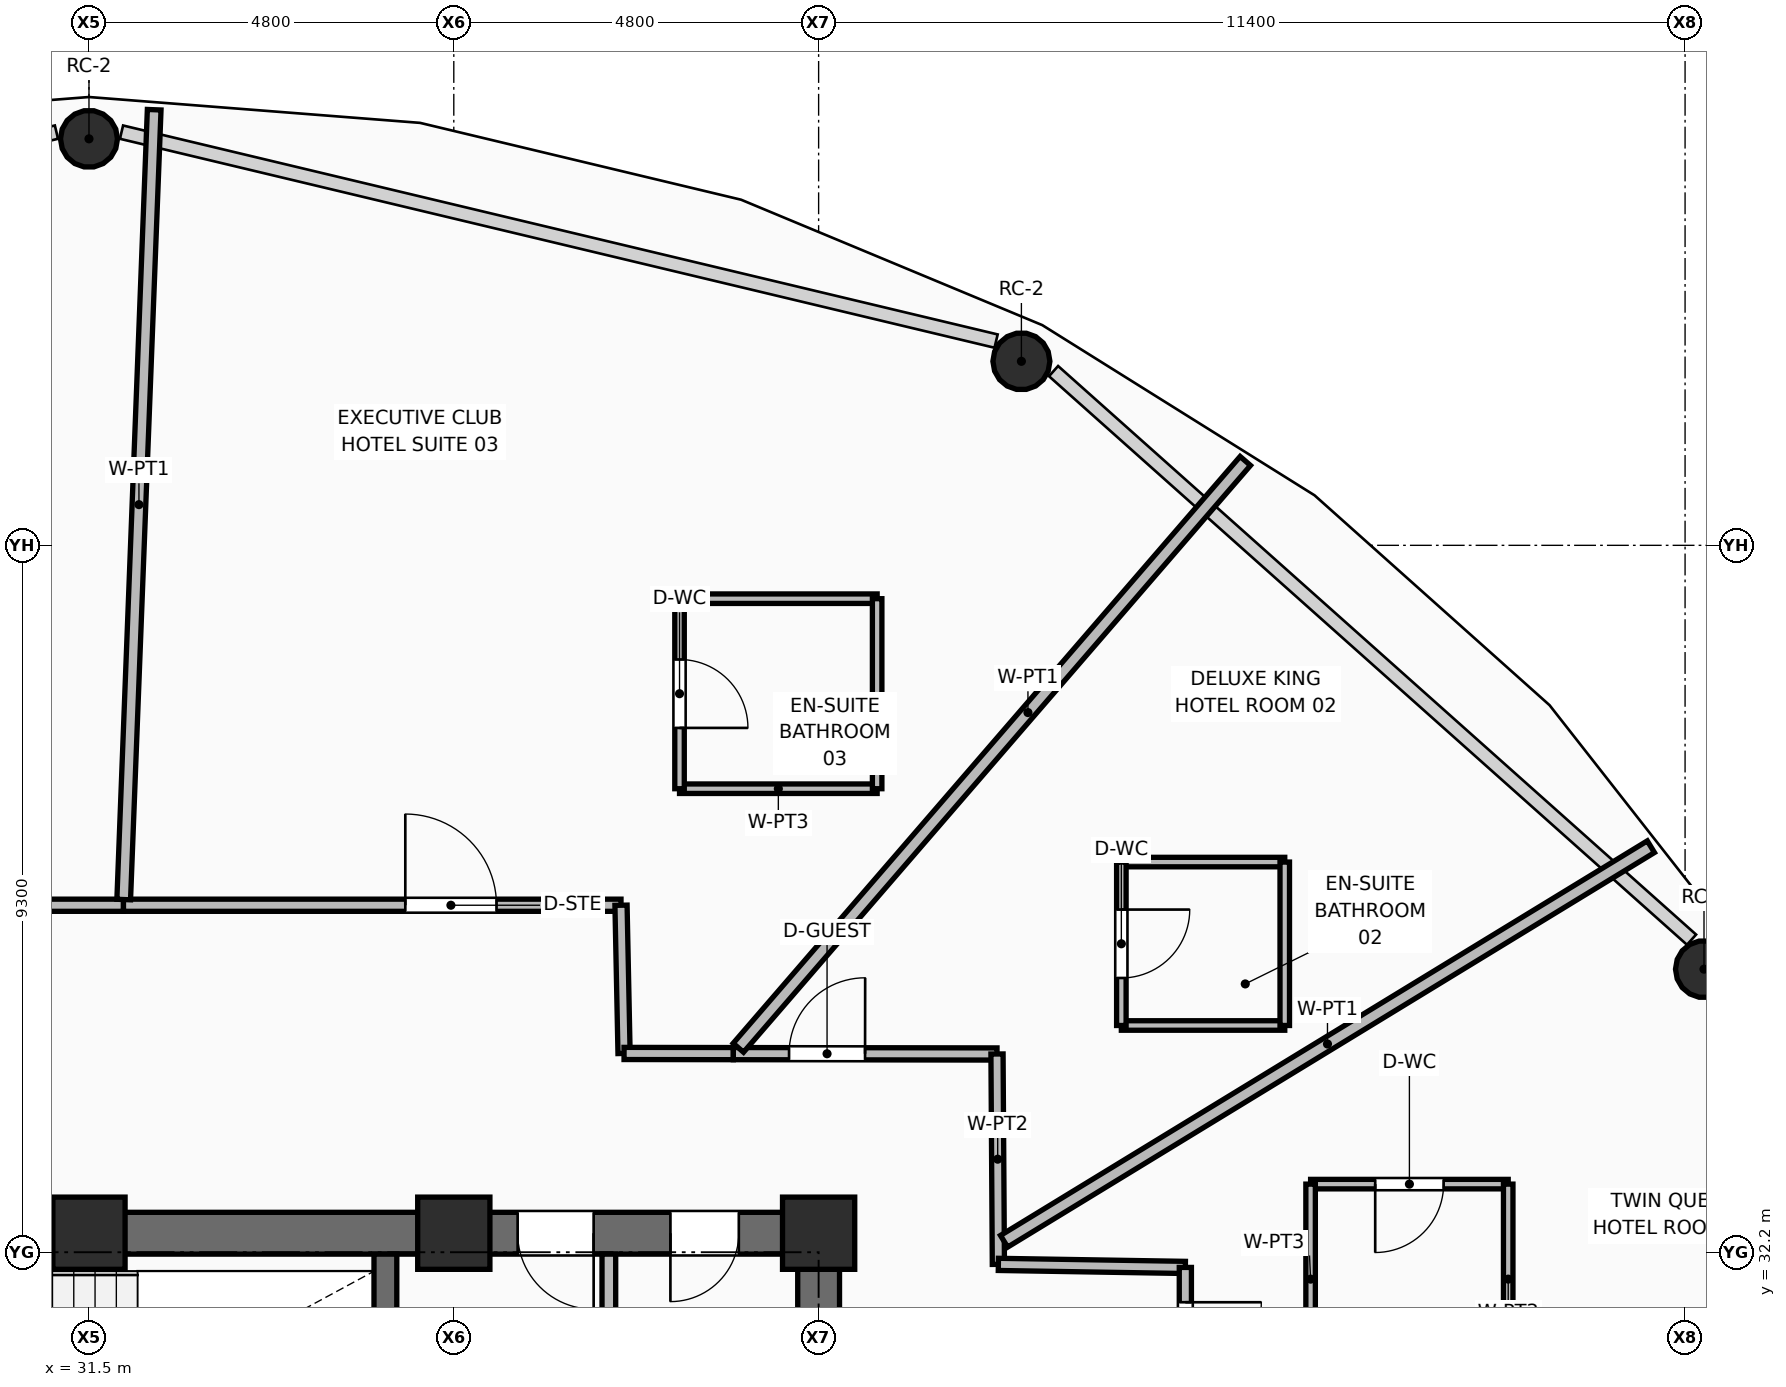
"""IFC4 building model, lengths in metres.
Left out: names, types, materials, properties, quantities, classifications, styles, units other than length and angle.
Written with IfcOpenShell. Run it as: python <this file> out.ifc"""

import sys

from ifc_helpers import new_model, si_unit, direction, frame, frame_2d, origin, origin_2d, place, context, subcontext, project, spatial, rectangle, hollow_circle, extrude, element, fill, save


model = new_model("IFC4")
c1 = context("Model", 3, precision=1e-05, world=origin(), true_north=direction((0.0, 1.0)))
c2 = subcontext(c1, "Body", "Model", "MODEL_VIEW")
j1 = project(units=[si_unit("LENGTHUNIT", "METRE"), si_unit("PLANEANGLEUNIT", "RADIAN")], contexts=[c1])
p1 = place(None, origin())
s1 = spatial("IfcSite", under=j1, at=p1, CompositionType="ELEMENT")
p2 = place(p1, origin())
s2 = spatial("IfcBuilding", under=s1, at=p2, CompositionType="ELEMENT")
p3 = place(p2, frame((0.0, 0.0, 168.45)))
s3 = spatial("IfcBuildingStorey", under=s2, at=p3, CompositionType="ELEMENT", Elevation=168.45)
for number, where, z_axis, x_axis in (
    (1, (31.5, 32.45, 0.0), (0.0, 0.0, 1.0), (1.0, 0.0, 0.0)),
    (2, (36.3, 32.45, 0.0), (0.0, 0.0, 1.0), (1.0, 0.0, 0.0)),
    (3, (41.1, 32.45, 0.0), (0.0, 0.0, 1.0), (1.0, 0.0, 0.0)),
):
    element("IfcColumn", number, at=place(p3, frame(where, z_axis=z_axis, x_axis=x_axis)), inside=s3, PredefinedType="COLUMN", context=c2, shape_type="SweptSolid", body=[
        extrude(rectangle(XDim=0.95, YDim=0.95, at=origin_2d()), origin(), (0.0, 0.0, 1.0), 3.75),
    ])
for number, where, z_axis, x_axis in (
    (4, (52.749, 35.924, 0.0), (0.0, 0.0, 1.0), (1.0, 0.0, 0.0)),
    (5, (43.768, 43.921, 0.0), (0.0, 0.0, 1.0), (1.0, 0.0, 0.0)),
    (6, (31.5, 46.848, 0.0), (0.0, 0.0, 1.0), (1.0, 0.0, 0.0)),
):
    element("IfcColumn", number, at=place(p3, frame(where, z_axis=z_axis, x_axis=x_axis)), inside=s3, PredefinedType="COLUMN", context=c2, shape_type="SweptSolid", body=[
        extrude(hollow_circle(Radius=0.375, WallThickness=0.035, at=origin_2d()), origin(), (0.0, 0.0, 1.0), 3.57),
    ])
p4 = place(p3, frame((21.625, 32.45, 0.0), z_axis=(0.0, 0.0, 1.0), x_axis=(1.0, 0.0, 0.0)))
e7 = element("IfcWall", 7, at=p4, inside=s3, PredefinedType="SHEAR", context=c2, shape_type="SweptSolid", body=[
    extrude(rectangle(XDim=19.75, YDim=0.55, at=frame_2d((9.875, 0.0))), origin(), (0.0, 0.0, 1.0), 3.57),
])
p5 = place(p4, frame((2.125, 0.0, 0.0)))
e8 = element("IfcOpeningElement", 8, at=p5, cuts=e7, PredefinedType="OPENING", context=c2, shape_type="SweptSolid", body=[
    extrude(rectangle(XDim=1.1, YDim=2.1, at=frame_2d((0.55, 1.05))), frame((0.0, 0.285, 0.0), z_axis=(0.0, -1.0, 0.0), x_axis=(1.0, 0.0, 0.0)), (0.0, 0.0, 1.0), 0.57),
])
p6 = place(p4, frame((15.515, 0.0, 0.0)))
e9 = element("IfcOpeningElement", 9, at=p6, cuts=e7, PredefinedType="OPENING", context=c2, shape_type="SweptSolid", body=[
    extrude(rectangle(XDim=1.0, YDim=2.1, at=frame_2d((0.5, 1.05))), frame((0.0, 0.285, 0.0), z_axis=(0.0, -1.0, 0.0), x_axis=(1.0, 0.0, 0.0)), (0.0, 0.0, 1.0), 0.57),
])
p7 = place(p4, frame((17.525, 0.0, 0.0)))
e10 = element("IfcOpeningElement", 10, at=p7, cuts=e7, PredefinedType="OPENING", context=c2, shape_type="SweptSolid", body=[
    extrude(rectangle(XDim=0.9, YDim=2.1, at=frame_2d((0.45, 1.05))), frame((0.0, 0.285, 0.0), z_axis=(0.0, -1.0, 0.0), x_axis=(1.0, 0.0, 0.0)), (0.0, 0.0, 1.0), 0.57),
])
p8 = place(p3, frame((41.1, 18.075, 0.0), z_axis=(0.0, 0.0, 1.0), x_axis=(0.0, 1.0, 0.0)))
e11 = element("IfcWall", 11, at=p8, inside=s3, PredefinedType="SHEAR", context=c2, shape_type="SweptSolid", body=[
    extrude(rectangle(XDim=14.1, YDim=0.55, at=frame_2d((7.05, 0.0))), origin(), (0.0, 0.0, 1.0), 3.57),
])
p9 = place(p8, frame((3.385, 0.0, 0.0)))
e12 = element("IfcOpeningElement", 12, at=p9, cuts=e11, PredefinedType="OPENING", context=c2, shape_type="SweptSolid", body=[
    extrude(rectangle(XDim=1.05, YDim=2.1, at=frame_2d((0.525, 1.05))), frame((0.0, 0.285, 0.0), z_axis=(0.0, -1.0, 0.0), x_axis=(1.0, 0.0, 0.0)), (0.0, 0.0, 1.0), 0.57),
])
p10 = place(p3, frame((35.4, 28.75, 0.0), z_axis=(0.0, 0.0, 1.0), x_axis=(0.0, 1.0, 0.0)))
e13 = element("IfcWall", 13, at=p10, inside=s3, PredefinedType="SHEAR", context=c2, shape_type="SweptSolid", body=[
    extrude(rectangle(XDim=3.425, YDim=0.3, at=frame_2d((1.712, 0.0))), origin(), (0.0, 0.0, 1.0), 3.57),
])
p11 = place(p3, frame((38.34, 28.62, 0.0), z_axis=(0.0, 0.0, 1.0), x_axis=(0.0, 1.0, 0.0)))
e14 = element("IfcWall", 14, at=p11, inside=s3, PredefinedType="PARTITIONING", context=c2, shape_type="SweptSolid", body=[
    extrude(rectangle(XDim=3.555, YDim=0.18, at=frame_2d((1.777, 0.0))), origin(), (0.0, 0.0, 1.0), 3.55),
])
p12 = place(p3, frame((24.496, 36.765, 0.0), z_axis=(0.0, 0.0, 1.0), x_axis=(1.0, 0.0, 0.0)))
e15 = element("IfcWall", 15, at=p12, inside=s3, PredefinedType="PARTITIONING", context=c2, shape_type="SweptSolid", body=[
    extrude(rectangle(XDim=7.458, YDim=0.16, at=frame_2d((3.729, 0.0))), origin(), (0.0, 0.0, 1.0), 3.006),
])
p13 = place(p12, frame((2.684, 0.0, 0.0)))
e16 = element("IfcOpeningElement", 16, at=p13, cuts=e15, PredefinedType="OPENING", context=c2, shape_type="SweptSolid", body=[
    extrude(rectangle(XDim=1.2, YDim=2.1, at=frame_2d((0.6, 1.05))), frame((0.0, 0.09, 0.0), z_axis=(0.0, -1.0, 0.0), x_axis=(1.0, 0.0, 0.0)), (0.0, 0.0, 1.0), 0.18),
])
p14 = place(p3, frame((31.954, 36.765, 0.0), z_axis=(0.0, 0.0, 1.0), x_axis=(1.0, 0.0, 0.0)))
e17 = element("IfcWall", 17, at=p14, inside=s3, PredefinedType="PARTITIONING", context=c2, shape_type="SweptSolid", body=[
    extrude(rectangle(XDim=6.546, YDim=0.16, at=frame_2d((3.273, 0.0))), origin(), (0.0, 0.0, 1.0), 3.55),
])
p15 = place(p14, frame((3.708, 0.0, 0.0)))
e18 = element("IfcOpeningElement", 18, at=p15, cuts=e17, PredefinedType="OPENING", context=c2, shape_type="SweptSolid", body=[
    extrude(rectangle(XDim=1.2, YDim=2.1, at=frame_2d((0.6, 1.05))), frame((0.0, 0.09, 0.0), z_axis=(0.0, -1.0, 0.0), x_axis=(1.0, 0.0, 0.0)), (0.0, 0.0, 1.0), 0.18),
])
p16 = place(p3, frame((38.5, 36.765, 0.0), z_axis=(0.0, 0.0, 1.0), x_axis=(0.020529039459, -0.999789257063, 0.0)))
e19 = element("IfcWall", 19, at=p16, inside=s3, PredefinedType="PARTITIONING", context=c2, shape_type="SweptSolid", body=[
    extrude(rectangle(XDim=1.95, YDim=0.16, at=frame_2d((0.975, 0.0))), origin(), (0.0, 0.0, 1.0), 3.55),
])
p17 = place(p3, frame((38.54, 34.815, 0.0), z_axis=(0.0, 0.0, 1.0), x_axis=(0.999999077601, -0.001358233043, 0.0)))
e20 = element("IfcWall", 20, at=p17, inside=s3, PredefinedType="PARTITIONING", context=c2, shape_type="SweptSolid", body=[
    extrude(rectangle(XDim=1.438, YDim=0.16, at=frame_2d((0.719, 0.0))), origin(), (0.0, 0.0, 1.0), 3.55),
])
p18 = place(p3, frame((39.978, 34.813, 0.0), z_axis=(0.0, 0.0, 1.0), x_axis=(0.999999009391, -0.001407557195, 0.0)))
e21 = element("IfcWall", 21, at=p18, inside=s3, PredefinedType="PARTITIONING", context=c2, shape_type="SweptSolid", body=[
    extrude(rectangle(XDim=3.469, YDim=0.16, at=frame_2d((1.734, 0.0))), origin(), (0.0, 0.0, 1.0), 3.006),
])
p19 = place(p18, frame((0.733, 0.0, 0.0)))
e22 = element("IfcOpeningElement", 22, at=p19, cuts=e21, PredefinedType="OPENING", context=c2, shape_type="SweptSolid", body=[
    extrude(rectangle(XDim=1.0, YDim=2.1, at=frame_2d((0.5, 1.05))), frame((0.0, 0.09, 0.0), z_axis=(0.0, -1.0, 0.0), x_axis=(1.0, 0.0, 0.0)), (0.0, 0.0, 1.0), 0.18),
])
p20 = place(p3, frame((43.447, 34.808, 0.0), z_axis=(0.0, 0.0, 1.0), x_axis=(0.006526585281, -0.999978701615, 0.0)))
e23 = element("IfcWall", 23, at=p20, inside=s3, PredefinedType="PARTITIONING", context=c2, shape_type="SweptSolid", body=[
    extrude(rectangle(XDim=2.768, YDim=0.16, at=frame_2d((1.384, 0.0))), origin(), (0.0, 0.0, 1.0), 3.006),
])
p21 = place(p3, frame((43.465, 32.04, 0.0), z_axis=(0.0, 0.0, 1.0), x_axis=(0.999867567339, -0.016274144605, 0.0)))
e24 = element("IfcWall", 24, at=p21, inside=s3, PredefinedType="PARTITIONING", context=c2, shape_type="SweptSolid", body=[
    extrude(rectangle(XDim=2.46, YDim=0.16, at=frame_2d((1.23, 0.0))), origin(), (0.0, 0.0, 1.0), 3.55),
])
p22 = place(p3, frame((45.925, 32.0, 0.0), z_axis=(0.0, 0.0, 1.0), x_axis=(0.0, -1.0, 0.0)))
e25 = element("IfcWall", 25, at=p22, inside=s3, PredefinedType="PARTITIONING", context=c2, shape_type="SweptSolid", body=[
    extrude(rectangle(XDim=3.259, YDim=0.16, at=frame_2d((1.629, 0.0))), origin(), (0.0, 0.0, 1.0), 3.55),
])
p23 = place(p22, frame((0.458, 0.0, 0.0)))
e26 = element("IfcOpeningElement", 26, at=p23, cuts=e25, PredefinedType="OPENING", context=c2, shape_type="SweptSolid", body=[
    extrude(rectangle(XDim=1.0, YDim=2.1, at=frame_2d((0.5, 1.05))), frame((0.0, 0.09, 0.0), z_axis=(0.0, -1.0, 0.0), x_axis=(1.0, 0.0, 0.0)), (0.0, 0.0, 1.0), 0.18),
])
p24 = place(p3, frame((43.54, 32.344, 0.0), z_axis=(0.0, 0.0, 1.0), x_axis=(0.853711993856, 0.520745457537, 0.0)))
e27 = element("IfcWall", 27, at=p24, inside=s3, PredefinedType="PARTITIONING", context=c2, shape_type="SweptSolid", body=[
    extrude(rectangle(XDim=9.968, YDim=0.18, at=frame_2d((4.984, 0.0))), origin(), (0.0, 0.0, 1.0), 2.852),
])
p25 = place(p3, frame((40.044, 34.89, 0.0), z_axis=(0.0, 0.0, 1.0), x_axis=(0.653771871809, 0.756691707125, 0.0)))
e28 = element("IfcWall", 28, at=p25, inside=s3, PredefinedType="PARTITIONING", context=c2, shape_type="SweptSolid", body=[
    extrude(rectangle(XDim=10.203, YDim=0.18, at=frame_2d((5.101, 0.0))), origin(), (0.0, 0.0, 1.0), 2.852),
])
p26 = place(p3, frame((31.957, 36.84, 0.0), z_axis=(0.0, 0.0, 1.0), x_axis=(0.038551241221, 0.999256624597, 0.0)))
e29 = element("IfcWall", 29, at=p26, inside=s3, PredefinedType="PARTITIONING", context=c2, shape_type="SweptSolid", body=[
    extrude(rectangle(XDim=10.399, YDim=0.18, at=frame_2d((5.199, 0.0))), origin(), (0.0, 0.0, 1.0), 2.852),
])
p27 = place(p3, frame((47.573, 33.096, 0.0), z_axis=(0.0, 0.0, 1.0), x_axis=(1.0, 0.0, 0.0)))
e30 = element("IfcWall", 30, at=p27, inside=s3, PredefinedType="PARTITIONING", context=c2, shape_type="SweptSolid", body=[
    extrude(rectangle(XDim=2.6, YDim=0.125, at=frame_2d((1.3, 0.0))), origin(), (0.0, 0.0, 1.0), 3.55),
])
p28 = place(p27, frame((0.85, 0.0, 0.0)))
e31 = element("IfcOpeningElement", 31, at=p28, cuts=e30, PredefinedType="OPENING", context=c2, shape_type="SweptSolid", body=[
    extrude(rectangle(XDim=0.9, YDim=2.1, at=frame_2d((0.45, 1.05))), frame((0.0, 0.073, 0.0), z_axis=(0.0, -1.0, 0.0), x_axis=(1.0, 0.0, 0.0)), (0.0, 0.0, 1.0), 0.145),
])
for number, where, z_axis, x_axis in (
    (32, (47.573, 30.596, 0.0), (0.0, 0.0, 1.0), (0.0, 1.0, 0.0)),
    (33, (50.173, 30.596, 0.0), (0.0, 0.0, 1.0), (0.0, 1.0, 0.0)),
):
    element("IfcWall", number, at=place(p3, frame(where, z_axis=z_axis, x_axis=x_axis)), inside=s3, PredefinedType="PARTITIONING", context=c2, shape_type="SweptSolid", body=[
        extrude(rectangle(XDim=2.5, YDim=0.125, at=frame_2d((1.25, 0.0))), origin(), (0.0, 0.0, 1.0), 3.55),
    ])
for number, where, z_axis, x_axis in (
    (34, (45.083, 35.183, 0.0), (0.0, 0.0, 1.0), (1.0, 0.0, 0.0)),
    (35, (45.083, 37.333, 0.0), (0.0, 0.0, 1.0), (1.0, 0.0, 0.0)),
):
    element("IfcWall", number, at=place(p3, frame(where, z_axis=z_axis, x_axis=x_axis)), inside=s3, PredefinedType="PARTITIONING", context=c2, shape_type="SweptSolid", body=[
        extrude(rectangle(XDim=2.15, YDim=0.125, at=frame_2d((1.075, 0.0))), origin(), (0.0, 0.0, 1.0), 3.55),
    ])
p29 = place(p3, frame((45.083, 35.183, 0.0), z_axis=(0.0, 0.0, 1.0), x_axis=(0.0, 1.0, 0.0)))
e36 = element("IfcWall", 36, at=p29, inside=s3, PredefinedType="PARTITIONING", context=c2, shape_type="SweptSolid", body=[
    extrude(rectangle(XDim=2.15, YDim=0.125, at=frame_2d((1.075, 0.0))), origin(), (0.0, 0.0, 1.0), 3.55),
])
p30 = place(p29, frame((0.625, 0.0, 0.0)))
e37 = element("IfcOpeningElement", 37, at=p30, cuts=e36, PredefinedType="OPENING", context=c2, shape_type="SweptSolid", body=[
    extrude(rectangle(XDim=0.9, YDim=2.1, at=frame_2d((0.45, 1.05))), frame((0.0, 0.073, 0.0), z_axis=(0.0, -1.0, 0.0), x_axis=(1.0, 0.0, 0.0)), (0.0, 0.0, 1.0), 0.145),
])
p31 = place(p3, frame((47.233, 35.183, 0.0), z_axis=(0.0, 0.0, 1.0), x_axis=(0.0, 1.0, 0.0)))
e38 = element("IfcWall", 38, at=p31, inside=s3, PredefinedType="PARTITIONING", context=c2, shape_type="SweptSolid", body=[
    extrude(rectangle(XDim=2.15, YDim=0.125, at=frame_2d((1.075, 0.0))), origin(), (0.0, 0.0, 1.0), 3.55),
])
for number, where, z_axis, x_axis in (
    (39, (39.27, 38.298, 0.0), (0.0, 0.0, 1.0), (1.0, 0.0, 0.0)),
    (40, (39.27, 40.798, 0.0), (0.0, 0.0, 1.0), (1.0, 0.0, 0.0)),
):
    element("IfcWall", number, at=place(p3, frame(where, z_axis=z_axis, x_axis=x_axis)), inside=s3, PredefinedType="PARTITIONING", context=c2, shape_type="SweptSolid", body=[
        extrude(rectangle(XDim=2.6, YDim=0.125, at=frame_2d((1.3, 0.0))), origin(), (0.0, 0.0, 1.0), 3.55),
    ])
p32 = place(p3, frame((39.27, 38.298, 0.0), z_axis=(0.0, 0.0, 1.0), x_axis=(0.0, 1.0, 0.0)))
e41 = element("IfcWall", 41, at=p32, inside=s3, PredefinedType="PARTITIONING", context=c2, shape_type="SweptSolid", body=[
    extrude(rectangle(XDim=2.5, YDim=0.125, at=frame_2d((1.25, 0.0))), origin(), (0.0, 0.0, 1.0), 3.55),
])
p33 = place(p32, frame((0.8, 0.0, 0.0)))
e42 = element("IfcOpeningElement", 42, at=p33, cuts=e41, PredefinedType="OPENING", context=c2, shape_type="SweptSolid", body=[
    extrude(rectangle(XDim=0.9, YDim=2.1, at=frame_2d((0.45, 1.05))), frame((0.0, 0.073, 0.0), z_axis=(0.0, -1.0, 0.0), x_axis=(1.0, 0.0, 0.0)), (0.0, 0.0, 1.0), 0.145),
])
p34 = place(p3, frame((41.87, 38.298, 0.0), z_axis=(0.0, 0.0, 1.0), x_axis=(0.0, 1.0, 0.0)))
e43 = element("IfcWall", 43, at=p34, inside=s3, PredefinedType="PARTITIONING", context=c2, shape_type="SweptSolid", body=[
    extrude(rectangle(XDim=2.5, YDim=0.125, at=frame_2d((1.25, 0.0))), origin(), (0.0, 0.0, 1.0), 3.55),
])
p35 = place(p6, frame((1.0, 0.0, 0.0), z_axis=(0.0, 0.0, 1.0), x_axis=(-1.0, 0.0, 0.0)))
e44 = element("IfcDoor", 44, at=p35, inside=s3, OperationType="SINGLE_SWING_LEFT", PredefinedType="DOOR", context=c2, shape_type="SweptSolid", body=[
    extrude(rectangle(XDim=1.0, YDim=2.1, at=frame_2d((0.5, 1.05))), frame((0.0, 0.025, 0.0), z_axis=(0.0, -1.0, 0.0), x_axis=(1.0, 0.0, 0.0)), (0.0, 0.0, 1.0), 0.05),
])
fill(e9, e44)
p36 = place(p7, frame((0.9, 0.0, 0.0), z_axis=(0.0, 0.0, 1.0), x_axis=(-1.0, 0.0, 0.0)))
e45 = element("IfcDoor", 45, at=p36, inside=s3, OperationType="SINGLE_SWING_RIGHT", PredefinedType="DOOR", context=c2, shape_type="SweptSolid", body=[
    extrude(rectangle(XDim=0.9, YDim=2.1, at=frame_2d((0.45, 1.05))), frame((0.0, 0.025, 0.0), z_axis=(0.0, -1.0, 0.0), x_axis=(1.0, 0.0, 0.0)), (0.0, 0.0, 1.0), 0.05),
])
fill(e10, e45)
p37 = place(p28, frame((0.9, 0.0, 0.0), z_axis=(0.0, 0.0, 1.0), x_axis=(-1.0, 0.0, 0.0)))
e46 = element("IfcDoor", 46, at=p37, inside=s3, OperationType="SINGLE_SWING_RIGHT", PredefinedType="DOOR", context=c2, shape_type="SweptSolid", body=[
    extrude(rectangle(XDim=0.9, YDim=2.1, at=frame_2d((0.45, 1.05))), frame((0.0, 0.025, 0.0), z_axis=(0.0, -1.0, 0.0), x_axis=(1.0, 0.0, 0.0)), (0.0, 0.0, 1.0), 0.05),
])
fill(e31, e46)
p38 = place(p23, origin())
e47 = element("IfcDoor", 47, at=p38, inside=s3, OperationType="SINGLE_SWING_LEFT", PredefinedType="DOOR", context=c2, shape_type="SweptSolid", body=[
    extrude(rectangle(XDim=1.0, YDim=2.1, at=frame_2d((0.5, 1.05))), frame((0.0, 0.025, 0.0), z_axis=(0.0, -1.0, 0.0), x_axis=(1.0, 0.0, 0.0)), (0.0, 0.0, 1.0), 0.05),
])
fill(e26, e47)
p39 = place(p30, frame((0.9, 0.0, 0.0), z_axis=(0.0, 0.0, 1.0), x_axis=(-1.0, 0.0, 0.0)))
e48 = element("IfcDoor", 48, at=p39, inside=s3, OperationType="SINGLE_SWING_LEFT", PredefinedType="DOOR", context=c2, shape_type="SweptSolid", body=[
    extrude(rectangle(XDim=0.9, YDim=2.1, at=frame_2d((0.45, 1.05))), frame((0.0, 0.025, 0.0), z_axis=(0.0, -1.0, 0.0), x_axis=(1.0, 0.0, 0.0)), (0.0, 0.0, 1.0), 0.05),
])
fill(e37, e48)
p40 = place(p19, origin())
e49 = element("IfcDoor", 49, at=p40, inside=s3, OperationType="SINGLE_SWING_RIGHT", PredefinedType="DOOR", context=c2, shape_type="SweptSolid", body=[
    extrude(rectangle(XDim=1.0, YDim=2.1, at=frame_2d((0.5, 1.05))), frame((0.0, 0.025, 0.0), z_axis=(0.0, -1.0, 0.0), x_axis=(1.0, 0.0, 0.0)), (0.0, 0.0, 1.0), 0.05),
])
fill(e22, e49)
p41 = place(p33, frame((0.9, 0.0, 0.0), z_axis=(0.0, 0.0, 1.0), x_axis=(-1.0, 0.0, 0.0)))
e50 = element("IfcDoor", 50, at=p41, inside=s3, OperationType="SINGLE_SWING_RIGHT", PredefinedType="DOOR", context=c2, shape_type="SweptSolid", body=[
    extrude(rectangle(XDim=0.9, YDim=2.1, at=frame_2d((0.45, 1.05))), frame((0.0, 0.025, 0.0), z_axis=(0.0, -1.0, 0.0), x_axis=(1.0, 0.0, 0.0)), (0.0, 0.0, 1.0), 0.05),
])
fill(e42, e50)
p42 = place(p15, origin())
e51 = element("IfcDoor", 51, at=p42, inside=s3, OperationType="SINGLE_SWING_LEFT", PredefinedType="DOOR", context=c2, shape_type="SweptSolid", body=[
    extrude(rectangle(XDim=1.2, YDim=2.1, at=frame_2d((0.6, 1.05))), frame((0.0, 0.025, 0.0), z_axis=(0.0, -1.0, 0.0), x_axis=(1.0, 0.0, 0.0)), (0.0, 0.0, 1.0), 0.05),
])
fill(e18, e51)
save(model, sys.argv[1])
